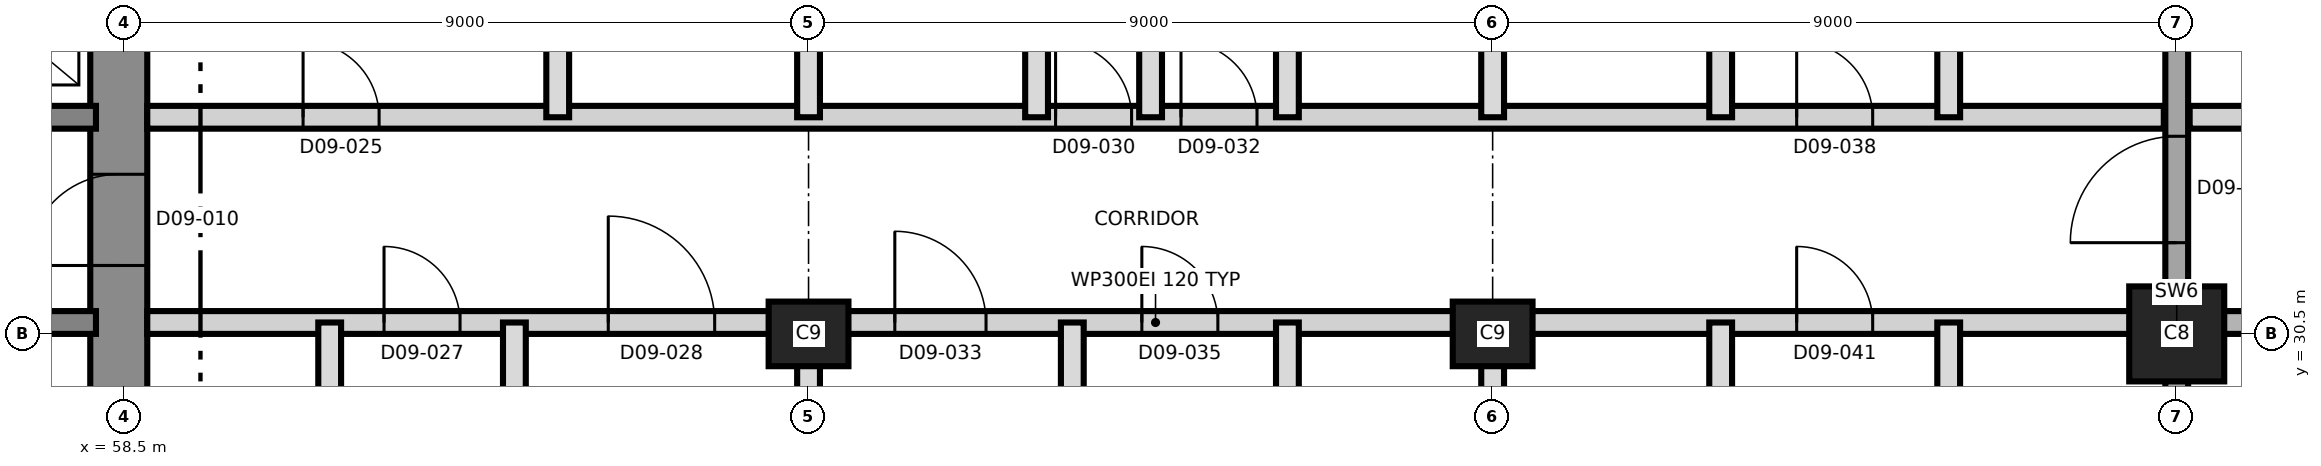
"""IFC4 building model, lengths in metres.
Left out: names, types, materials, properties, quantities, classifications, styles, units other than length and angle.
Written with IfcOpenShell. Run it as: python <this file> out.ifc"""

import sys

from ifc_helpers import new_model, si_unit, direction, frame, frame_2d, origin, origin_2d, place, context, subcontext, project, spatial, rectangle, extrude, element, fill, save


model = new_model("IFC4")
c1 = context("Model", 3, precision=1e-05, world=origin(), true_north=direction((0.0, 1.0)))
c2 = subcontext(c1, "Body", "Model", "MODEL_VIEW")
j1 = project(units=[si_unit("LENGTHUNIT", "METRE"), si_unit("PLANEANGLEUNIT", "RADIAN")], contexts=[c1])
p1 = place(None, origin())
s1 = spatial("IfcSite", under=j1, at=p1, CompositionType="ELEMENT")
p2 = place(p1, origin())
s2 = spatial("IfcBuilding", under=s1, at=p2, CompositionType="ELEMENT")
p3 = place(p2, frame((0.0, 0.0, 105.6)))
s3 = spatial("IfcBuildingStorey", under=s2, at=p3, CompositionType="ELEMENT", Elevation=105.6)
p4 = place(p3, frame((58.425, 21.125, 0.0), z_axis=(0.0, 0.0, 1.0), x_axis=(0.0, 1.0, 0.0)))
e1 = element("IfcWall", 1, at=p4, inside=s3, PredefinedType="SHEAR", context=c2, shape_type="SweptSolid", body=[
    extrude(rectangle(XDim=18.75, YDim=0.75, at=frame_2d((9.375, 0.0))), origin(), (0.0, 0.0, 1.0), 3.7),
])
p5 = place(p4, frame((10.275, 0.0, 0.0)))
e2 = element("IfcOpeningElement", 2, at=p5, cuts=e1, PredefinedType="OPENING", context=c2, shape_type="SweptSolid", body=[
    extrude(rectangle(XDim=1.2, YDim=2.1, at=frame_2d((0.6, 1.05))), frame((0.0, 0.385, 0.0), z_axis=(0.0, -1.0, 0.0), x_axis=(1.0, 0.0, 0.0)), (0.0, 0.0, 1.0), 0.77),
])
p6 = place(p3, frame((31.875, 30.65, 0.0), z_axis=(0.0, 0.0, 1.0), x_axis=(1.0, 0.0, 0.0)))
e3 = element("IfcWall", 3, at=p6, inside=s3, PredefinedType="SHEAR", context=c2, shape_type="SweptSolid", body=[
    extrude(rectangle(XDim=26.25, YDim=0.3, at=frame_2d((13.125, 0.0))), origin(), (0.0, 0.0, 1.0), 3.7),
])
p7 = place(p6, frame((24.625, 0.0, 0.0)))
e4 = element("IfcOpeningElement", 4, at=p7, cuts=e3, PredefinedType="OPENING", context=c2, shape_type="SweptSolid", body=[
    extrude(rectangle(XDim=1.0, YDim=2.1, at=frame_2d((0.5, 1.05))), frame((0.0, 0.16, 0.0), z_axis=(0.0, -1.0, 0.0), x_axis=(1.0, 0.0, 0.0)), (0.0, 0.0, 1.0), 0.32),
])
p8 = place(p6, frame((11.425, 0.0, 0.0)))
e5 = element("IfcOpeningElement", 5, at=p8, cuts=e3, PredefinedType="OPENING", context=c2, shape_type="SweptSolid", body=[
    extrude(rectangle(XDim=1.0, YDim=2.1, at=frame_2d((0.5, 1.05))), frame((0.0, 0.16, 0.0), z_axis=(0.0, -1.0, 0.0), x_axis=(1.0, 0.0, 0.0)), (0.0, 0.0, 1.0), 0.32),
])
p9 = place(p3, frame((31.875, 33.35, 0.0), z_axis=(0.0, 0.0, 1.0), x_axis=(1.0, 0.0, 0.0)))
e6 = element("IfcWall", 6, at=p9, inside=s3, PredefinedType="SHEAR", context=c2, shape_type="SweptSolid", body=[
    extrude(rectangle(XDim=26.25, YDim=0.3, at=frame_2d((13.125, 0.0))), origin(), (0.0, 0.0, 1.0), 3.7),
])
p10 = place(p9, frame((13.775, 0.0, 0.0)))
e7 = element("IfcOpeningElement", 7, at=p10, cuts=e6, PredefinedType="OPENING", context=c2, shape_type="SweptSolid", body=[
    extrude(rectangle(XDim=1.4, YDim=2.1, at=frame_2d((0.7, 1.05))), frame((0.0, 0.16, 0.0), z_axis=(0.0, -1.0, 0.0), x_axis=(1.0, 0.0, 0.0)), (0.0, 0.0, 1.0), 0.32),
])
p11 = place(p9, frame((5.25, 0.0, 0.0)))
e8 = element("IfcOpeningElement", 8, at=p11, cuts=e6, PredefinedType="OPENING", context=c2, shape_type="SweptSolid", body=[
    extrude(rectangle(XDim=1.2, YDim=2.1, at=frame_2d((0.6, 1.05))), frame((0.0, 0.16, 0.0), z_axis=(0.0, -1.0, 0.0), x_axis=(1.0, 0.0, 0.0)), (0.0, 0.0, 1.0), 0.32),
])
p12 = place(p9, frame((19.8, 0.0, 0.0)))
e9 = element("IfcOpeningElement", 9, at=p12, cuts=e6, PredefinedType="OPENING", context=c2, shape_type="SweptSolid", body=[
    extrude(rectangle(XDim=1.2, YDim=2.1, at=frame_2d((0.6, 1.05))), frame((0.0, 0.16, 0.0), z_axis=(0.0, -1.0, 0.0), x_axis=(1.0, 0.0, 0.0)), (0.0, 0.0, 1.0), 0.32),
])
for number, where, z_axis, x_axis in (
    (10, (67.5, 30.5, 0.0), (0.0, 0.0, 1.0), (1.0, 0.0, 0.0)),
    (11, (76.5, 30.5, 0.0), (0.0, 0.0, 1.0), (1.0, 0.0, 0.0)),
):
    element("IfcColumn", number, at=place(p3, frame(where, z_axis=z_axis, x_axis=x_axis)), inside=s3, PredefinedType="COLUMN", context=c2, shape_type="SweptSolid", body=[
        extrude(rectangle(XDim=1.05, YDim=0.85, at=origin_2d()), origin(), (0.0, 0.0, 1.0), 3.7),
    ])
p13 = place(p3, frame((85.5, 30.5, 0.0), z_axis=(0.0, 0.0, 1.0), x_axis=(1.0, 0.0, 0.0)))
e12 = element("IfcColumn", 12, at=p13, inside=s3, PredefinedType="COLUMN", context=c2, shape_type="SweptSolid", body=[
    extrude(rectangle(XDim=1.25, YDim=1.25, at=origin_2d()), origin(), (0.0, 0.0, 1.0), 3.7),
])
p14 = place(p3, frame((85.5, 20.35, 0.0), z_axis=(0.0, 0.0, 1.0), x_axis=(0.0, 1.0, 0.0)))
e13 = element("IfcWall", 13, at=p14, inside=s3, PredefinedType="SHEAR", context=c2, shape_type="SweptSolid", body=[
    extrude(rectangle(XDim=20.3, YDim=0.3, at=frame_2d((10.15, 0.0))), origin(), (0.0, 0.0, 1.0), 3.7),
])
p15 = place(p14, frame((11.35, 0.0, 0.0)))
e14 = element("IfcOpeningElement", 14, at=p15, cuts=e13, PredefinedType="OPENING", context=c2, shape_type="SweptSolid", body=[
    extrude(rectangle(XDim=1.4, YDim=2.1, at=frame_2d((0.7, 1.05))), frame((0.0, 0.16, 0.0), z_axis=(0.0, -1.0, 0.0), x_axis=(1.0, 0.0, 0.0)), (0.0, 0.0, 1.0), 0.32),
])
p16 = place(p3, frame((58.8, 30.65, 0.0), z_axis=(0.0, 0.0, 1.0), x_axis=(1.0, 0.0, 0.0)))
e15 = element("IfcWall", 15, at=p16, inside=s3, PredefinedType="PARTITIONING", context=c2, shape_type="SweptSolid", body=[
    extrude(rectangle(XDim=26.53, YDim=0.3, at=frame_2d((13.265, 0.0))), origin(), (0.0, 0.0, 1.0), 3.4),
])
p17 = place(p16, frame((3.115, 0.0, 0.0)))
e16 = element("IfcOpeningElement", 16, at=p17, cuts=e15, PredefinedType="OPENING", context=c2, shape_type="SweptSolid", body=[
    extrude(rectangle(XDim=1.0, YDim=2.1, at=frame_2d((0.5, 1.05))), frame((0.0, 0.16, 0.0), z_axis=(0.0, -1.0, 0.0), x_axis=(1.0, 0.0, 0.0)), (0.0, 0.0, 1.0), 0.32),
])
p18 = place(p16, frame((6.065, 0.0, 0.0)))
e17 = element("IfcOpeningElement", 17, at=p18, cuts=e15, PredefinedType="OPENING", context=c2, shape_type="SweptSolid", body=[
    extrude(rectangle(XDim=1.4, YDim=2.1, at=frame_2d((0.7, 1.05))), frame((0.0, 0.16, 0.0), z_axis=(0.0, -1.0, 0.0), x_axis=(1.0, 0.0, 0.0)), (0.0, 0.0, 1.0), 0.32),
])
p19 = place(p16, frame((9.835, 0.0, 0.0)))
e18 = element("IfcOpeningElement", 18, at=p19, cuts=e15, PredefinedType="OPENING", context=c2, shape_type="SweptSolid", body=[
    extrude(rectangle(XDim=1.2, YDim=2.1, at=frame_2d((0.6, 1.05))), frame((0.0, 0.16, 0.0), z_axis=(0.0, -1.0, 0.0), x_axis=(1.0, 0.0, 0.0)), (0.0, 0.0, 1.0), 0.32),
])
p20 = place(p16, frame((13.085, 0.0, 0.0)))
e19 = element("IfcOpeningElement", 19, at=p20, cuts=e15, PredefinedType="OPENING", context=c2, shape_type="SweptSolid", body=[
    extrude(rectangle(XDim=1.0, YDim=2.1, at=frame_2d((0.5, 1.05))), frame((0.0, 0.16, 0.0), z_axis=(0.0, -1.0, 0.0), x_axis=(1.0, 0.0, 0.0)), (0.0, 0.0, 1.0), 0.32),
])
p21 = place(p16, frame((21.7, 0.0, 0.0)))
e20 = element("IfcOpeningElement", 20, at=p21, cuts=e15, PredefinedType="OPENING", context=c2, shape_type="SweptSolid", body=[
    extrude(rectangle(XDim=1.0, YDim=2.4, at=frame_2d((0.5, 1.2))), frame((0.0, 0.16, 0.0), z_axis=(0.0, -1.0, 0.0), x_axis=(1.0, 0.0, 0.0)), (0.0, 0.0, 1.0), 0.32),
])
p22 = place(p3, frame((85.67, 30.65, 0.0), z_axis=(0.0, 0.0, 1.0), x_axis=(1.0, 0.0, 0.0)))
e21 = element("IfcWall", 21, at=p22, inside=s3, PredefinedType="SHEAR", context=c2, shape_type="SweptSolid", body=[
    extrude(rectangle(XDim=9.58, YDim=0.3, at=frame_2d((4.79, 0.0))), origin(), (0.0, 0.0, 1.0), 3.4),
])
p23 = place(p22, frame((2.08, 0.0, 0.0)))
e22 = element("IfcOpeningElement", 22, at=p23, cuts=e21, PredefinedType="OPENING", context=c2, shape_type="SweptSolid", body=[
    extrude(rectangle(XDim=1.2, YDim=2.1, at=frame_2d((0.6, 1.05))), frame((0.0, 0.16, 0.0), z_axis=(0.0, -1.0, 0.0), x_axis=(1.0, 0.0, 0.0)), (0.0, 0.0, 1.0), 0.32),
])
p24 = place(p22, frame((5.63, 0.0, 0.0)))
e23 = element("IfcOpeningElement", 23, at=p24, cuts=e21, PredefinedType="OPENING", context=c2, shape_type="SweptSolid", body=[
    extrude(rectangle(XDim=1.0, YDim=2.1, at=frame_2d((0.5, 1.05))), frame((0.0, 0.16, 0.0), z_axis=(0.0, -1.0, 0.0), x_axis=(1.0, 0.0, 0.0)), (0.0, 0.0, 1.0), 0.32),
])
p25 = place(p3, frame((58.8, 33.35, 0.0), z_axis=(0.0, 0.0, 1.0), x_axis=(1.0, 0.0, 0.0)))
e24 = element("IfcWall", 24, at=p25, inside=s3, PredefinedType="PARTITIONING", context=c2, shape_type="SweptSolid", body=[
    extrude(rectangle(XDim=26.53, YDim=0.3, at=frame_2d((13.265, 0.0))), origin(), (0.0, 0.0, 1.0), 3.4),
])
p26 = place(p25, frame((2.05, 0.0, 0.0)))
e25 = element("IfcOpeningElement", 25, at=p26, cuts=e24, PredefinedType="OPENING", context=c2, shape_type="SweptSolid", body=[
    extrude(rectangle(XDim=1.0, YDim=2.4, at=frame_2d((0.5, 1.2))), frame((0.0, 0.16, 0.0), z_axis=(0.0, -1.0, 0.0), x_axis=(1.0, 0.0, 0.0)), (0.0, 0.0, 1.0), 0.32),
])
p27 = place(p25, frame((11.95, 0.0, 0.0)))
e26 = element("IfcOpeningElement", 26, at=p27, cuts=e24, PredefinedType="OPENING", context=c2, shape_type="SweptSolid", body=[
    extrude(rectangle(XDim=1.0, YDim=2.1, at=frame_2d((0.5, 1.05))), frame((0.0, 0.16, 0.0), z_axis=(0.0, -1.0, 0.0), x_axis=(1.0, 0.0, 0.0)), (0.0, 0.0, 1.0), 0.32),
])
p28 = place(p25, frame((13.6, 0.0, 0.0)))
e27 = element("IfcOpeningElement", 27, at=p28, cuts=e24, PredefinedType="OPENING", context=c2, shape_type="SweptSolid", body=[
    extrude(rectangle(XDim=1.0, YDim=2.1, at=frame_2d((0.5, 1.05))), frame((0.0, 0.16, 0.0), z_axis=(0.0, -1.0, 0.0), x_axis=(1.0, 0.0, 0.0)), (0.0, 0.0, 1.0), 0.32),
])
p29 = place(p25, frame((21.7, 0.0, 0.0)))
e28 = element("IfcOpeningElement", 28, at=p29, cuts=e24, PredefinedType="OPENING", context=c2, shape_type="SweptSolid", body=[
    extrude(rectangle(XDim=1.0, YDim=2.4, at=frame_2d((0.5, 1.2))), frame((0.0, 0.16, 0.0), z_axis=(0.0, -1.0, 0.0), x_axis=(1.0, 0.0, 0.0)), (0.0, 0.0, 1.0), 0.32),
])
p30 = place(p3, frame((85.67, 33.35, 0.0), z_axis=(0.0, 0.0, 1.0), x_axis=(1.0, 0.0, 0.0)))
e29 = element("IfcWall", 29, at=p30, inside=s3, PredefinedType="PARTITIONING", context=c2, shape_type="SweptSolid", body=[
    extrude(rectangle(XDim=9.58, YDim=0.3, at=frame_2d((4.79, 0.0))), origin(), (0.0, 0.0, 1.0), 3.4),
])
p31 = place(p30, frame((1.83, 0.0, 0.0)))
e30 = element("IfcOpeningElement", 30, at=p31, cuts=e29, PredefinedType="OPENING", context=c2, shape_type="SweptSolid", body=[
    extrude(rectangle(XDim=1.0, YDim=2.1, at=frame_2d((0.5, 1.05))), frame((0.0, 0.16, 0.0), z_axis=(0.0, -1.0, 0.0), x_axis=(1.0, 0.0, 0.0)), (0.0, 0.0, 1.0), 0.32),
])
p32 = place(p30, frame((5.63, 0.0, 0.0)))
e31 = element("IfcOpeningElement", 31, at=p32, cuts=e29, PredefinedType="OPENING", context=c2, shape_type="SweptSolid", body=[
    extrude(rectangle(XDim=1.0, YDim=2.1, at=frame_2d((0.5, 1.05))), frame((0.0, 0.16, 0.0), z_axis=(0.0, -1.0, 0.0), x_axis=(1.0, 0.0, 0.0)), (0.0, 0.0, 1.0), 0.32),
])
p33 = place(p3, frame((61.2, 27.45, 0.0), z_axis=(0.0, 0.0, 1.0), x_axis=(0.0, 1.0, 0.0)))
e32 = element("IfcWall", 32, at=p33, inside=s3, PredefinedType="PARTITIONING", context=c2, shape_type="SweptSolid", body=[
    extrude(rectangle(XDim=3.2, YDim=0.3, at=frame_2d((1.6, 0.0))), origin(), (0.0, 0.0, 1.0), 3.4),
])
p34 = place(p3, frame((63.63, 20.35, 0.0), z_axis=(0.0, 0.0, 1.0), x_axis=(0.0, 1.0, 0.0)))
e33 = element("IfcWall", 33, at=p34, inside=s3, PredefinedType="PARTITIONING", context=c2, shape_type="SweptSolid", body=[
    extrude(rectangle(XDim=10.3, YDim=0.3, at=frame_2d((5.15, 0.0))), origin(), (0.0, 0.0, 1.0), 3.4),
])
p35 = place(p3, frame((64.2, 33.35, 0.0), z_axis=(0.0, 0.0, 1.0), x_axis=(0.0, 1.0, 0.0)))
e34 = element("IfcWall", 34, at=p35, inside=s3, PredefinedType="PARTITIONING", context=c2, shape_type="SweptSolid", body=[
    extrude(rectangle(XDim=3.5, YDim=0.3, at=frame_2d((1.75, 0.0))), origin(), (0.0, 0.0, 1.0), 3.4),
])
p36 = place(p3, frame((67.5, 20.35, 0.0), z_axis=(0.0, 0.0, 1.0), x_axis=(0.0, 1.0, 0.0)))
e35 = element("IfcWall", 35, at=p36, inside=s3, PredefinedType="PARTITIONING", context=c2, shape_type="SweptSolid", body=[
    extrude(rectangle(XDim=10.3, YDim=0.3, at=frame_2d((5.15, 0.0))), origin(), (0.0, 0.0, 1.0), 3.4),
])
p37 = place(p3, frame((67.5, 33.35, 0.0), z_axis=(0.0, 0.0, 1.0), x_axis=(0.0, 1.0, 0.0)))
e36 = element("IfcWall", 36, at=p37, inside=s3, PredefinedType="PARTITIONING", context=c2, shape_type="SweptSolid", body=[
    extrude(rectangle(XDim=7.48, YDim=0.3, at=frame_2d((3.74, 0.0))), origin(), (0.0, 0.0, 1.0), 3.4),
])
p38 = place(p3, frame((70.5, 33.35, 0.0), z_axis=(0.0, 0.0, 1.0), x_axis=(0.0, 1.0, 0.0)))
e37 = element("IfcWall", 37, at=p38, inside=s3, PredefinedType="PARTITIONING", context=c2, shape_type="SweptSolid", body=[
    extrude(rectangle(XDim=3.3, YDim=0.3, at=frame_2d((1.65, 0.0))), origin(), (0.0, 0.0, 1.0), 3.4),
])
p39 = place(p3, frame((70.97, 20.35, 0.0), z_axis=(0.0, 0.0, 1.0), x_axis=(0.0, 1.0, 0.0)))
e38 = element("IfcWall", 38, at=p39, inside=s3, PredefinedType="PARTITIONING", context=c2, shape_type="SweptSolid", body=[
    extrude(rectangle(XDim=10.3, YDim=0.3, at=frame_2d((5.15, 0.0))), origin(), (0.0, 0.0, 1.0), 3.4),
])
p40 = place(p3, frame((72.0, 33.35, 0.0), z_axis=(0.0, 0.0, 1.0), x_axis=(0.0, 1.0, 0.0)))
e39 = element("IfcWall", 39, at=p40, inside=s3, PredefinedType="PARTITIONING", context=c2, shape_type="SweptSolid", body=[
    extrude(rectangle(XDim=7.48, YDim=0.3, at=frame_2d((3.74, 0.0))), origin(), (0.0, 0.0, 1.0), 3.4),
])
for number, where, z_axis, x_axis in (
    (40, (73.8, 27.45, 0.0), (0.0, 0.0, 1.0), (0.0, 1.0, 0.0)),
    (41, (73.8, 33.35, 0.0), (0.0, 0.0, 1.0), (0.0, 1.0, 0.0)),
):
    element("IfcWall", number, at=place(p3, frame(where, z_axis=z_axis, x_axis=x_axis)), inside=s3, PredefinedType="PARTITIONING", context=c2, shape_type="SweptSolid", body=[
        extrude(rectangle(XDim=3.2, YDim=0.3, at=frame_2d((1.6, 0.0))), origin(), (0.0, 0.0, 1.0), 3.4),
    ])
p41 = place(p3, frame((76.5, 20.35, 0.0), z_axis=(0.0, 0.0, 1.0), x_axis=(0.0, 1.0, 0.0)))
e42 = element("IfcWall", 42, at=p41, inside=s3, PredefinedType="PARTITIONING", context=c2, shape_type="SweptSolid", body=[
    extrude(rectangle(XDim=10.3, YDim=0.3, at=frame_2d((5.15, 0.0))), origin(), (0.0, 0.0, 1.0), 3.4),
])
p42 = place(p3, frame((76.5, 33.35, 0.0), z_axis=(0.0, 0.0, 1.0), x_axis=(0.0, 1.0, 0.0)))
e43 = element("IfcWall", 43, at=p42, inside=s3, PredefinedType="PARTITIONING", context=c2, shape_type="SweptSolid", body=[
    extrude(rectangle(XDim=7.48, YDim=0.3, at=frame_2d((3.74, 0.0))), origin(), (0.0, 0.0, 1.0), 3.4),
])
for number, where, z_axis, x_axis in (
    (44, (79.5, 27.35, 0.0), (0.0, 0.0, 1.0), (0.0, 1.0, 0.0)),
    (45, (79.5, 33.35, 0.0), (0.0, 0.0, 1.0), (0.0, 1.0, 0.0)),
    (46, (82.5, 27.35, 0.0), (0.0, 0.0, 1.0), (0.0, 1.0, 0.0)),
    (47, (82.5, 33.35, 0.0), (0.0, 0.0, 1.0), (0.0, 1.0, 0.0)),
):
    element("IfcWall", number, at=place(p3, frame(where, z_axis=z_axis, x_axis=x_axis)), inside=s3, PredefinedType="PARTITIONING", context=c2, shape_type="SweptSolid", body=[
        extrude(rectangle(XDim=3.3, YDim=0.3, at=frame_2d((1.65, 0.0))), origin(), (0.0, 0.0, 1.0), 3.4),
    ])
p43 = place(p5, origin())
e48 = element("IfcDoor", 48, at=p43, inside=s3, OperationType="SINGLE_SWING_LEFT", PredefinedType="DOOR", context=c2, shape_type="SweptSolid", body=[
    extrude(rectangle(XDim=1.2, YDim=2.1, at=frame_2d((0.6, 1.05))), frame((0.0, 0.025, 0.0), z_axis=(0.0, -1.0, 0.0), x_axis=(1.0, 0.0, 0.0)), (0.0, 0.0, 1.0), 0.05),
])
fill(e2, e48)
p44 = place(p26, origin())
e49 = element("IfcDoor", 49, at=p44, inside=s3, OperationType="SINGLE_SWING_LEFT", PredefinedType="DOOR", context=c2, shape_type="SweptSolid", body=[
    extrude(rectangle(XDim=1.0, YDim=2.4, at=frame_2d((0.5, 1.2))), frame((0.0, 0.025, 0.0), z_axis=(0.0, -1.0, 0.0), x_axis=(1.0, 0.0, 0.0)), (0.0, 0.0, 1.0), 0.05),
])
fill(e25, e49)
p45 = place(p17, origin())
e50 = element("IfcDoor", 50, at=p45, inside=s3, OperationType="SINGLE_SWING_RIGHT", PredefinedType="DOOR", context=c2, shape_type="SweptSolid", body=[
    extrude(rectangle(XDim=1.0, YDim=2.1, at=frame_2d((0.5, 1.05))), frame((0.0, 0.025, 0.0), z_axis=(0.0, -1.0, 0.0), x_axis=(1.0, 0.0, 0.0)), (0.0, 0.0, 1.0), 0.05),
])
fill(e16, e50)
p46 = place(p18, origin())
e51 = element("IfcDoor", 51, at=p46, inside=s3, OperationType="SINGLE_SWING_LEFT", PredefinedType="DOOR", context=c2, shape_type="SweptSolid", body=[
    extrude(rectangle(XDim=1.4, YDim=2.1, at=frame_2d((0.7, 1.05))), frame((0.0, 0.025, 0.0), z_axis=(0.0, -1.0, 0.0), x_axis=(1.0, 0.0, 0.0)), (0.0, 0.0, 1.0), 0.05),
])
fill(e17, e51)
p47 = place(p27, origin())
e52 = element("IfcDoor", 52, at=p47, inside=s3, OperationType="SINGLE_SWING_RIGHT", PredefinedType="DOOR", context=c2, shape_type="SweptSolid", body=[
    extrude(rectangle(XDim=1.0, YDim=2.1, at=frame_2d((0.5, 1.05))), frame((0.0, 0.025, 0.0), z_axis=(0.0, -1.0, 0.0), x_axis=(1.0, 0.0, 0.0)), (0.0, 0.0, 1.0), 0.05),
])
fill(e26, e52)
p48 = place(p28, origin())
e53 = element("IfcDoor", 53, at=p48, inside=s3, OperationType="SINGLE_SWING_LEFT", PredefinedType="DOOR", context=c2, shape_type="SweptSolid", body=[
    extrude(rectangle(XDim=1.0, YDim=2.1, at=frame_2d((0.5, 1.05))), frame((0.0, 0.025, 0.0), z_axis=(0.0, -1.0, 0.0), x_axis=(1.0, 0.0, 0.0)), (0.0, 0.0, 1.0), 0.05),
])
fill(e27, e53)
p49 = place(p19, origin())
e54 = element("IfcDoor", 54, at=p49, inside=s3, OperationType="SINGLE_SWING_LEFT", PredefinedType="DOOR", context=c2, shape_type="SweptSolid", body=[
    extrude(rectangle(XDim=1.2, YDim=2.1, at=frame_2d((0.6, 1.05))), frame((0.0, 0.025, 0.0), z_axis=(0.0, -1.0, 0.0), x_axis=(1.0, 0.0, 0.0)), (0.0, 0.0, 1.0), 0.05),
])
fill(e18, e54)
p50 = place(p20, origin())
e55 = element("IfcDoor", 55, at=p50, inside=s3, OperationType="SINGLE_SWING_LEFT", PredefinedType="DOOR", context=c2, shape_type="SweptSolid", body=[
    extrude(rectangle(XDim=1.0, YDim=2.1, at=frame_2d((0.5, 1.05))), frame((0.0, 0.025, 0.0), z_axis=(0.0, -1.0, 0.0), x_axis=(1.0, 0.0, 0.0)), (0.0, 0.0, 1.0), 0.05),
])
fill(e19, e55)
p51 = place(p29, origin())
e56 = element("IfcDoor", 56, at=p51, inside=s3, OperationType="SINGLE_SWING_LEFT", PredefinedType="DOOR", context=c2, shape_type="SweptSolid", body=[
    extrude(rectangle(XDim=1.0, YDim=2.4, at=frame_2d((0.5, 1.2))), frame((0.0, 0.025, 0.0), z_axis=(0.0, -1.0, 0.0), x_axis=(1.0, 0.0, 0.0)), (0.0, 0.0, 1.0), 0.05),
])
fill(e28, e56)
p52 = place(p21, origin())
e57 = element("IfcDoor", 57, at=p52, inside=s3, OperationType="SINGLE_SWING_LEFT", PredefinedType="DOOR", context=c2, shape_type="SweptSolid", body=[
    extrude(rectangle(XDim=1.0, YDim=2.4, at=frame_2d((0.5, 1.2))), frame((0.0, 0.025, 0.0), z_axis=(0.0, -1.0, 0.0), x_axis=(1.0, 0.0, 0.0)), (0.0, 0.0, 1.0), 0.05),
])
fill(e20, e57)
p53 = place(p15, origin())
e58 = element("IfcDoor", 58, at=p53, inside=s3, OperationType="SINGLE_SWING_RIGHT", PredefinedType="DOOR", context=c2, shape_type="SweptSolid", body=[
    extrude(rectangle(XDim=1.4, YDim=2.1, at=frame_2d((0.7, 1.05))), frame((0.0, 0.025, 0.0), z_axis=(0.0, -1.0, 0.0), x_axis=(1.0, 0.0, 0.0)), (0.0, 0.0, 1.0), 0.05),
])
fill(e14, e58)
save(model, sys.argv[1])
